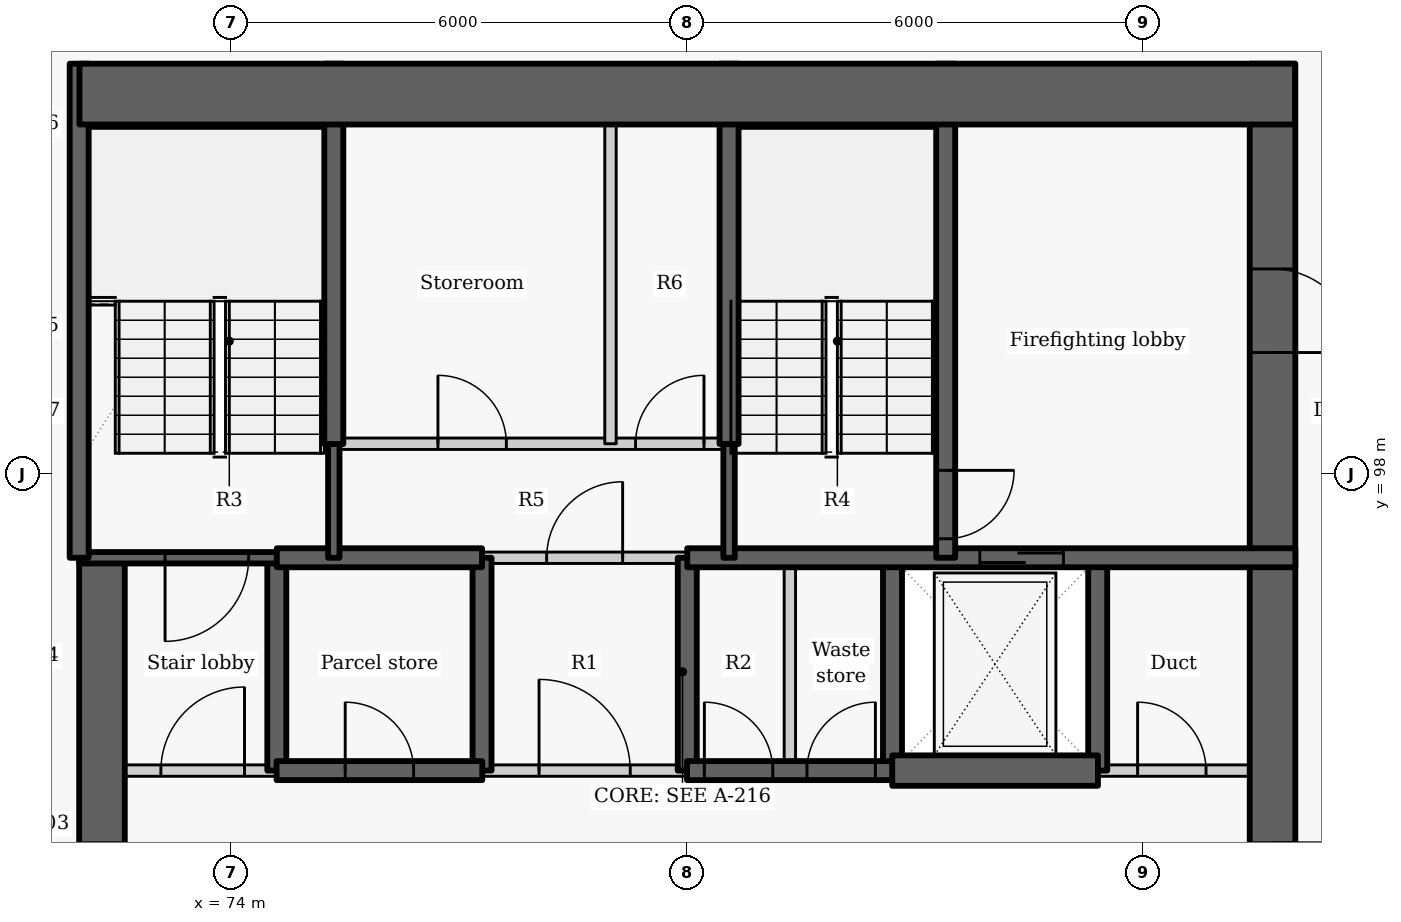
"""IFC4 building model, lengths in metres.
Left out: names, types, materials, properties, quantities, classifications, styles, units other than length and angle.
Written with IfcOpenShell. Run it as: python <this file> out.ifc"""

import sys

from ifc_helpers import new_model, si_unit, direction, frame, frame_2d, origin, place, context, subcontext, project, spatial, rectangle, extrude, element, fill, save


model = new_model("IFC4")
c1 = context("Model", 3, precision=1e-05, world=origin(), true_north=direction((0.0, 1.0)))
c2 = subcontext(c1, "Body", "Model", "MODEL_VIEW")
j1 = project(units=[si_unit("LENGTHUNIT", "METRE"), si_unit("PLANEANGLEUNIT", "RADIAN")], contexts=[c1])
p1 = place(None, origin())
s1 = spatial("IfcSite", under=j1, at=p1, CompositionType="ELEMENT")
p2 = place(p1, origin())
s2 = spatial("IfcBuilding", under=s1, at=p2, CompositionType="ELEMENT")
p3 = place(p2, frame((0.0, 0.0, 77.7)))
s3 = spatial("IfcBuildingStorey", under=s2, at=p3, CompositionType="ELEMENT", Elevation=77.7)
p4 = place(p3, frame((74.6, 94.1, -0.41), z_axis=(0.0, 0.0, 1.0), x_axis=(0.0, 1.0, 0.0)))
e1 = element("IfcWall", 1, at=p4, inside=s3, PredefinedType="SHEAR", context=c2, shape_type="SweptSolid", body=[
    extrude(rectangle(XDim=2.8, YDim=0.25, at=frame_2d((1.4, 0.0))), origin(), (0.0, 0.0, 1.0), 3.435),
])
p5 = place(p3, frame((72.3, 87.8, -0.41), z_axis=(0.0, 0.0, 1.0), x_axis=(0.0, 1.0, 0.0)))
e2 = element("IfcWall", 2, at=p5, inside=s3, PredefinedType="SHEAR", context=c2, shape_type="SweptSolid", body=[
    extrude(rectangle(XDim=9.1, YDim=0.6, at=frame_2d((4.55, 0.0))), origin(), (0.0, 0.0, 1.0), 3.435),
])
p6 = place(p5, frame((3.85, 0.0, 0.41)))
e3 = element("IfcOpeningElement", 3, at=p6, cuts=e2, PredefinedType="OPENING", context=c2, shape_type="SweptSolid", body=[
    extrude(rectangle(XDim=1.5, YDim=2.1, at=frame_2d((0.75, 1.05))), frame((0.0, 0.31, 0.0), z_axis=(0.0, -1.0, 0.0), x_axis=(1.0, 0.0, 0.0)), (0.0, 0.0, 1.0), 0.62),
])
for number, where, z_axis, x_axis in (
    (4, (77.3, 94.1, -0.41), (0.0, 0.0, 1.0), (0.0, 1.0, 0.0)),
    (5, (80.0, 94.1, -0.41), (0.0, 0.0, 1.0), (0.0, 1.0, 0.0)),
    (6, (82.7, 94.1, -0.41), (0.0, 0.0, 1.0), (0.0, 1.0, 0.0)),
    (7, (85.4, 94.1, -0.41), (0.0, 0.0, 1.0), (0.0, 1.0, 0.0)),
):
    element("IfcWall", number, at=place(p3, frame(where, z_axis=z_axis, x_axis=x_axis)), inside=s3, PredefinedType="SHEAR", context=c2, shape_type="SweptSolid", body=[
        extrude(rectangle(XDim=2.8, YDim=0.25, at=frame_2d((1.4, 0.0))), origin(), (0.0, 0.0, 1.0), 3.435),
    ])
p7 = place(p3, frame((87.7, 103.4, -0.41), z_axis=(0.0, 0.0, 1.0), x_axis=(0.0, -1.0, 0.0)))
e8 = element("IfcWall", 8, at=p7, inside=s3, PredefinedType="SHEAR", context=c2, shape_type="SweptSolid", body=[
    extrude(rectangle(XDim=15.6, YDim=0.6, at=frame_2d((7.8, 0.0))), origin(), (0.0, 0.0, 1.0), 3.435),
])
p8 = place(p7, frame((10.25, 0.0, 0.41)))
e9 = element("IfcOpeningElement", 9, at=p8, cuts=e8, PredefinedType="OPENING", context=c2, shape_type="SweptSolid", body=[
    extrude(rectangle(XDim=1.5, YDim=2.1, at=frame_2d((0.75, 1.05))), frame((0.0, 0.31, 0.0), z_axis=(0.0, -1.0, 0.0), x_axis=(1.0, 0.0, 0.0)), (0.0, 0.0, 1.0), 0.62),
])
p9 = place(p7, frame((2.7, 0.0, 0.41)))
e10 = element("IfcOpeningElement", 10, at=p9, cuts=e8, PredefinedType="OPENING", context=c2, shape_type="SweptSolid", body=[
    extrude(rectangle(XDim=1.1, YDim=2.1, at=frame_2d((0.55, 1.05))), frame((0.0, 0.31, 0.0), z_axis=(0.0, -1.0, 0.0), x_axis=(1.0, 0.0, 0.0)), (0.0, 0.0, 1.0), 0.62),
])
p10 = place(p3, frame((72.0, 94.1, 0.0), z_axis=(0.0, 0.0, 1.0), x_axis=(1.0, 0.0, 0.0)))
e11 = element("IfcWall", 11, at=p10, inside=s3, PredefinedType="PARTITIONING", context=c2, shape_type="SweptSolid", body=[
    extrude(rectangle(XDim=2.603, YDim=0.15, at=frame_2d((1.302, 0.0))), origin(), (0.0, 0.0, 1.0), 3.025),
])
p11 = place(p10, frame((1.075, 0.0, 0.0)))
e12 = element("IfcOpeningElement", 12, at=p11, cuts=e11, PredefinedType="OPENING", context=c2, shape_type="SweptSolid", body=[
    extrude(rectangle(XDim=1.1, YDim=2.1, at=frame_2d((0.55, 1.05))), frame((0.0, 0.085, 0.0), z_axis=(0.0, -1.0, 0.0), x_axis=(1.0, 0.0, 0.0)), (0.0, 0.0, 1.0), 0.17),
])
p12 = place(p3, frame((77.297, 94.1, 0.0), z_axis=(0.0, 0.0, 1.0), x_axis=(1.0, 0.0, 0.0)))
e13 = element("IfcWall", 13, at=p12, inside=s3, PredefinedType="PARTITIONING", context=c2, shape_type="SweptSolid", body=[
    extrude(rectangle(XDim=2.706, YDim=0.15, at=frame_2d((1.353, 0.0))), origin(), (0.0, 0.0, 1.0), 3.025),
])
p13 = place(p12, frame((0.753, 0.0, 0.0)))
e14 = element("IfcOpeningElement", 14, at=p13, cuts=e13, PredefinedType="OPENING", context=c2, shape_type="SweptSolid", body=[
    extrude(rectangle(XDim=1.2, YDim=2.1, at=frame_2d((0.6, 1.05))), frame((0.0, 0.085, 0.0), z_axis=(0.0, -1.0, 0.0), x_axis=(1.0, 0.0, 0.0)), (0.0, 0.0, 1.0), 0.17),
])
p14 = place(p3, frame((85.397, 94.1, 0.0), z_axis=(0.0, 0.0, 1.0), x_axis=(1.0, 0.0, 0.0)))
e15 = element("IfcWall", 15, at=p14, inside=s3, PredefinedType="PARTITIONING", context=c2, shape_type="SweptSolid", body=[
    extrude(rectangle(XDim=2.603, YDim=0.15, at=frame_2d((1.302, 0.0))), origin(), (0.0, 0.0, 1.0), 3.025),
])
p15 = place(p14, frame((0.528, 0.0, 0.0)))
e16 = element("IfcOpeningElement", 16, at=p15, cuts=e15, PredefinedType="OPENING", context=c2, shape_type="SweptSolid", body=[
    extrude(rectangle(XDim=0.9, YDim=2.1, at=frame_2d((0.45, 1.05))), frame((0.0, 0.085, 0.0), z_axis=(0.0, -1.0, 0.0), x_axis=(1.0, 0.0, 0.0)), (0.0, 0.0, 1.0), 0.17),
])
p16 = place(p3, frame((74.597, 94.1, -0.41), z_axis=(0.0, 0.0, 1.0), x_axis=(1.0, 0.0, 0.0)))
e17 = element("IfcWall", 17, at=p16, inside=s3, PredefinedType="SHEAR", context=c2, shape_type="SweptSolid", body=[
    extrude(rectangle(XDim=2.706, YDim=0.25, at=frame_2d((1.353, 0.0))), origin(), (0.0, 0.0, 1.0), 3.435),
])
p17 = place(p16, frame((0.903, 0.0, 0.41)))
e18 = element("IfcOpeningElement", 18, at=p17, cuts=e17, PredefinedType="OPENING", context=c2, shape_type="SweptSolid", body=[
    extrude(rectangle(XDim=0.9, YDim=2.1, at=frame_2d((0.45, 1.05))), frame((0.0, 0.135, 0.0), z_axis=(0.0, -1.0, 0.0), x_axis=(1.0, 0.0, 0.0)), (0.0, 0.0, 1.0), 0.27),
])
p18 = place(p3, frame((79.997, 94.1, -0.41), z_axis=(0.0, 0.0, 1.0), x_axis=(1.0, 0.0, 0.0)))
e19 = element("IfcWall", 19, at=p18, inside=s3, PredefinedType="SHEAR", context=c2, shape_type="SweptSolid", body=[
    extrude(rectangle(XDim=2.706, YDim=0.25, at=frame_2d((1.353, 0.0))), origin(), (0.0, 0.0, 1.0), 3.435),
])
p19 = place(p18, frame((0.228, 0.0, 0.41)))
e20 = element("IfcOpeningElement", 20, at=p19, cuts=e19, PredefinedType="OPENING", context=c2, shape_type="SweptSolid", body=[
    extrude(rectangle(XDim=0.9, YDim=2.1, at=frame_2d((0.45, 1.05))), frame((0.0, 0.135, 0.0), z_axis=(0.0, -1.0, 0.0), x_axis=(1.0, 0.0, 0.0)), (0.0, 0.0, 1.0), 0.27),
])
p20 = place(p18, frame((1.578, 0.0, 0.41)))
e21 = element("IfcOpeningElement", 21, at=p20, cuts=e19, PredefinedType="OPENING", context=c2, shape_type="SweptSolid", body=[
    extrude(rectangle(XDim=0.9, YDim=2.1, at=frame_2d((0.45, 1.05))), frame((0.0, 0.135, 0.0), z_axis=(0.0, -1.0, 0.0), x_axis=(1.0, 0.0, 0.0)), (0.0, 0.0, 1.0), 0.27),
])
p21 = place(p3, frame((82.697, 94.1, -0.41), z_axis=(0.0, 0.0, 1.0), x_axis=(1.0, 0.0, 0.0)))
e22 = element("IfcWall", 22, at=p21, inside=s3, PredefinedType="SHEAR", context=c2, shape_type="SweptSolid", body=[
    extrude(rectangle(XDim=2.706, YDim=0.4, at=frame_2d((1.353, 0.0))), origin(), (0.0, 0.0, 1.0), 3.435),
])
p22 = place(p3, frame((74.6, 96.9, -0.41), z_axis=(0.0, 0.0, 1.0), x_axis=(-1.0, 0.0, 0.0)))
e23 = element("IfcWall", 23, at=p22, inside=s3, PredefinedType="SHEAR", context=c2, shape_type="SweptSolid", body=[
    extrude(rectangle(XDim=2.6, YDim=0.15, at=frame_2d((1.3, 0.0))), origin(), (0.0, 0.0, 1.0), 3.435),
])
p23 = place(p22, frame((0.37, 0.0, 0.41)))
e24 = element("IfcOpeningElement", 24, at=p23, cuts=e23, PredefinedType="OPENING", context=c2, shape_type="SweptSolid", body=[
    extrude(rectangle(XDim=1.1, YDim=2.1, at=frame_2d((0.55, 1.05))), frame((0.0, 0.085, 0.0), z_axis=(0.0, -1.0, 0.0), x_axis=(1.0, 0.0, 0.0)), (0.0, 0.0, 1.0), 0.17),
])
p24 = place(p3, frame((74.6, 96.9, -0.41), z_axis=(0.0, 0.0, 1.0), x_axis=(1.0, 0.0, 0.0)))
e25 = element("IfcWall", 25, at=p24, inside=s3, PredefinedType="SHEAR", context=c2, shape_type="SweptSolid", body=[
    extrude(rectangle(XDim=2.7, YDim=0.25, at=frame_2d((1.35, 0.0))), origin(), (0.0, 0.0, 1.0), 3.435),
])
p25 = place(p3, frame((80.0, 96.9, -0.41), z_axis=(0.0, 0.0, 1.0), x_axis=(1.0, 0.0, 0.0)))
e26 = element("IfcWall", 26, at=p25, inside=s3, PredefinedType="SHEAR", context=c2, shape_type="SweptSolid", body=[
    extrude(rectangle(XDim=8.0, YDim=0.25, at=frame_2d((4.0, 0.0))), origin(), (0.0, 0.0, 1.0), 3.435),
])
p26 = place(p25, frame((3.849, 0.0, 0.41)))
e27 = element("IfcOpeningElement", 27, at=p26, cuts=e26, PredefinedType="OPENING", context=c2, shape_type="SweptSolid", body=[
    extrude(rectangle(XDim=1.1, YDim=2.1, at=frame_2d((0.55, 1.05))), frame((0.0, 0.135, 0.0), z_axis=(0.0, -1.0, 0.0), x_axis=(1.0, 0.0, 0.0)), (0.0, 0.0, 1.0), 0.27),
])
p27 = place(p3, frame((77.3, 96.9, 0.0), z_axis=(0.0, 0.0, 1.0), x_axis=(1.0, 0.0, 0.0)))
e28 = element("IfcWall", 28, at=p27, inside=s3, PredefinedType="PARTITIONING", context=c2, shape_type="SweptSolid", body=[
    extrude(rectangle(XDim=2.7, YDim=0.15, at=frame_2d((1.35, 0.0))), origin(), (0.0, 0.0, 1.0), 3.025),
])
p28 = place(p27, frame((0.85, 0.0, 0.0)))
e29 = element("IfcOpeningElement", 29, at=p28, cuts=e28, PredefinedType="OPENING", context=c2, shape_type="SweptSolid", body=[
    extrude(rectangle(XDim=1.0, YDim=2.1, at=frame_2d((0.5, 1.05))), frame((0.0, 0.085, 0.0), z_axis=(0.0, -1.0, 0.0), x_axis=(1.0, 0.0, 0.0)), (0.0, 0.0, 1.0), 0.17),
])
p29 = place(p3, frame((81.35, 94.1, 0.0), z_axis=(0.0, 0.0, 1.0), x_axis=(0.0, 1.0, 0.0)))
e30 = element("IfcWall", 30, at=p29, inside=s3, PredefinedType="PARTITIONING", context=c2, shape_type="SweptSolid", body=[
    extrude(rectangle(XDim=2.8, YDim=0.15, at=frame_2d((1.4, 0.0))), origin(), (0.0, 0.0, 1.0), 3.025),
])
p30 = place(p3, frame((75.35, 96.9, -0.41), z_axis=(0.0, 0.0, 1.0), x_axis=(0.0, 1.0, 0.0)))
e31 = element("IfcWall", 31, at=p30, inside=s3, PredefinedType="SHEAR", context=c2, shape_type="SweptSolid", body=[
    extrude(rectangle(XDim=1.503, YDim=0.15, at=frame_2d((0.751, 0.0))), origin(), (0.0, 0.0, 1.0), 3.435),
])
p31 = place(p3, frame((75.35, 98.397, -0.41), z_axis=(0.0, 0.0, 1.0), x_axis=(0.0, 1.0, 0.0)))
e32 = element("IfcWall", 32, at=p31, inside=s3, PredefinedType="SHEAR", context=c2, shape_type="SweptSolid", body=[
    extrude(rectangle(XDim=5.003, YDim=0.25, at=frame_2d((2.501, 0.0))), origin(), (0.0, 0.0, 1.0), 3.435),
])
p32 = place(p3, frame((72.0, 96.9, -0.41), z_axis=(0.0, 0.0, 1.0), x_axis=(0.0, 1.0, 0.0)))
e33 = element("IfcWall", 33, at=p32, inside=s3, PredefinedType="SHEAR", context=c2, shape_type="SweptSolid", body=[
    extrude(rectangle(XDim=6.5, YDim=0.25, at=frame_2d((3.25, 0.0))), origin(), (0.0, 0.0, 1.0), 3.435),
])
p33 = place(p3, frame((83.4, 103.4, -0.41), z_axis=(0.0, 0.0, 1.0), x_axis=(0.0, -1.0, 0.0)))
e34 = element("IfcWall", 34, at=p33, inside=s3, PredefinedType="SHEAR", context=c2, shape_type="SweptSolid", body=[
    extrude(rectangle(XDim=6.5, YDim=0.25, at=frame_2d((3.25, 0.0))), origin(), (0.0, 0.0, 1.0), 3.435),
])
p34 = place(p33, frame((5.35, 0.0, 0.41)))
e35 = element("IfcOpeningElement", 35, at=p34, cuts=e34, PredefinedType="OPENING", context=c2, shape_type="SweptSolid", body=[
    extrude(rectangle(XDim=0.9, YDim=2.1, at=frame_2d((0.45, 1.05))), frame((0.0, 0.135, 0.0), z_axis=(0.0, -1.0, 0.0), x_axis=(1.0, 0.0, 0.0)), (0.0, 0.0, 1.0), 0.27),
])
p35 = place(p3, frame((80.55, 96.9, -0.41), z_axis=(0.0, 0.0, 1.0), x_axis=(0.0, 1.0, 0.0)))
e36 = element("IfcWall", 36, at=p35, inside=s3, PredefinedType="SHEAR", context=c2, shape_type="SweptSolid", body=[
    extrude(rectangle(XDim=1.503, YDim=0.15, at=frame_2d((0.751, 0.0))), origin(), (0.0, 0.0, 1.0), 3.435),
])
p36 = place(p3, frame((80.55, 98.397, -0.41), z_axis=(0.0, 0.0, 1.0), x_axis=(0.0, 1.0, 0.0)))
e37 = element("IfcWall", 37, at=p36, inside=s3, PredefinedType="SHEAR", context=c2, shape_type="SweptSolid", body=[
    extrude(rectangle(XDim=5.003, YDim=0.25, at=frame_2d((2.501, 0.0))), origin(), (0.0, 0.0, 1.0), 3.435),
])
p37 = place(p3, frame((75.35, 98.4, 0.0), z_axis=(0.0, 0.0, 1.0), x_axis=(1.0, 0.0, 0.0)))
e38 = element("IfcWall", 38, at=p37, inside=s3, PredefinedType="PARTITIONING", context=c2, shape_type="SweptSolid", body=[
    extrude(rectangle(XDim=5.2, YDim=0.15, at=frame_2d((2.6, 0.0))), origin(), (0.0, 0.0, 1.0), 3.025),
])
p38 = place(p37, frame((1.37, 0.0, 0.0)))
e39 = element("IfcOpeningElement", 39, at=p38, cuts=e38, PredefinedType="OPENING", context=c2, shape_type="SweptSolid", body=[
    extrude(rectangle(XDim=0.9, YDim=2.1, at=frame_2d((0.45, 1.05))), frame((0.0, 0.085, 0.0), z_axis=(0.0, -1.0, 0.0), x_axis=(1.0, 0.0, 0.0)), (0.0, 0.0, 1.0), 0.17),
])
p39 = place(p37, frame((3.97, 0.0, 0.0)))
e40 = element("IfcOpeningElement", 40, at=p39, cuts=e38, PredefinedType="OPENING", context=c2, shape_type="SweptSolid", body=[
    extrude(rectangle(XDim=0.9, YDim=2.1, at=frame_2d((0.45, 1.05))), frame((0.0, 0.085, 0.0), z_axis=(0.0, -1.0, 0.0), x_axis=(1.0, 0.0, 0.0)), (0.0, 0.0, 1.0), 0.17),
])
p40 = place(p3, frame((78.99, 98.4, 0.0), z_axis=(0.0, 0.0, 1.0), x_axis=(0.0, 1.0, 0.0)))
e41 = element("IfcWall", 41, at=p40, inside=s3, PredefinedType="PARTITIONING", context=c2, shape_type="SweptSolid", body=[
    extrude(rectangle(XDim=5.0, YDim=0.15, at=frame_2d((2.5, 0.0))), origin(), (0.0, 0.0, 1.0), 3.025),
])
p41 = place(p3, frame((72.004, 103.0, -0.41), z_axis=(0.0, 0.0, 1.0), x_axis=(1.0, 0.0, 0.0)))
e42 = element("IfcWall", 42, at=p41, inside=s3, PredefinedType="SHEAR", context=c2, shape_type="SweptSolid", body=[
    extrude(rectangle(XDim=15.992, YDim=0.8, at=frame_2d((7.996, 0.0))), origin(), (0.0, 0.0, 1.0), 3.435),
])
p42 = place(p11, origin())
e43 = element("IfcDoor", 43, at=p42, inside=s3, OperationType="SINGLE_SWING_RIGHT", PredefinedType="DOOR", context=c2, shape_type="SweptSolid", body=[
    extrude(rectangle(XDim=1.1, YDim=2.1, at=frame_2d((0.55, 1.05))), frame((0.0, 0.025, 0.0), z_axis=(0.0, -1.0, 0.0), x_axis=(1.0, 0.0, 0.0)), (0.0, 0.0, 1.0), 0.05),
])
fill(e12, e43)
p43 = place(p17, origin())
e44 = element("IfcDoor", 44, at=p43, inside=s3, OperationType="SINGLE_SWING_LEFT", PredefinedType="DOOR", context=c2, shape_type="SweptSolid", body=[
    extrude(rectangle(XDim=0.9, YDim=2.1, at=frame_2d((0.45, 1.05))), frame((0.0, 0.025, 0.0), z_axis=(0.0, -1.0, 0.0), x_axis=(1.0, 0.0, 0.0)), (0.0, 0.0, 1.0), 0.05),
])
fill(e18, e44)
p44 = place(p13, origin())
e45 = element("IfcDoor", 45, at=p44, inside=s3, OperationType="DOUBLE_DOOR_SINGLE_SWING", PredefinedType="DOOR", context=c2, shape_type="SweptSolid", body=[
    extrude(rectangle(XDim=1.2, YDim=2.1, at=frame_2d((0.6, 1.05))), frame((0.0, 0.025, 0.0), z_axis=(0.0, -1.0, 0.0), x_axis=(1.0, 0.0, 0.0)), (0.0, 0.0, 1.0), 0.05),
])
fill(e14, e45)
p45 = place(p19, origin())
e46 = element("IfcDoor", 46, at=p45, inside=s3, OperationType="SINGLE_SWING_LEFT", PredefinedType="DOOR", context=c2, shape_type="SweptSolid", body=[
    extrude(rectangle(XDim=0.9, YDim=2.1, at=frame_2d((0.45, 1.05))), frame((0.0, 0.025, 0.0), z_axis=(0.0, -1.0, 0.0), x_axis=(1.0, 0.0, 0.0)), (0.0, 0.0, 1.0), 0.05),
])
fill(e20, e46)
p46 = place(p20, origin())
e47 = element("IfcDoor", 47, at=p46, inside=s3, OperationType="SINGLE_SWING_RIGHT", PredefinedType="DOOR", context=c2, shape_type="SweptSolid", body=[
    extrude(rectangle(XDim=0.9, YDim=2.1, at=frame_2d((0.45, 1.05))), frame((0.0, 0.025, 0.0), z_axis=(0.0, -1.0, 0.0), x_axis=(1.0, 0.0, 0.0)), (0.0, 0.0, 1.0), 0.05),
])
fill(e21, e47)
p47 = place(p26, origin())
e48 = element("IfcDoor", 48, at=p47, inside=s3, OperationType="SLIDING_TO_LEFT", PredefinedType="DOOR", context=c2, shape_type="SweptSolid", body=[
    extrude(rectangle(XDim=1.1, YDim=2.1, at=frame_2d((0.55, 1.05))), frame((0.0, 0.025, 0.0), z_axis=(0.0, -1.0, 0.0), x_axis=(1.0, 0.0, 0.0)), (0.0, 0.0, 1.0), 0.05),
])
fill(e27, e48)
p48 = place(p15, origin())
e49 = element("IfcDoor", 49, at=p48, inside=s3, OperationType="SINGLE_SWING_LEFT", PredefinedType="DOOR", context=c2, shape_type="SweptSolid", body=[
    extrude(rectangle(XDim=0.9, YDim=2.1, at=frame_2d((0.45, 1.05))), frame((0.0, 0.025, 0.0), z_axis=(0.0, -1.0, 0.0), x_axis=(1.0, 0.0, 0.0)), (0.0, 0.0, 1.0), 0.05),
])
fill(e16, e49)
p49 = place(p28, origin())
e50 = element("IfcDoor", 50, at=p49, inside=s3, OperationType="SINGLE_SWING_RIGHT", PredefinedType="DOOR", context=c2, shape_type="SweptSolid", body=[
    extrude(rectangle(XDim=1.0, YDim=2.1, at=frame_2d((0.5, 1.05))), frame((0.0, 0.025, 0.0), z_axis=(0.0, -1.0, 0.0), x_axis=(1.0, 0.0, 0.0)), (0.0, 0.0, 1.0), 0.05),
])
fill(e29, e50)
p50 = place(p38, origin())
e51 = element("IfcDoor", 51, at=p50, inside=s3, OperationType="SINGLE_SWING_LEFT", PredefinedType="DOOR", context=c2, shape_type="SweptSolid", body=[
    extrude(rectangle(XDim=0.9, YDim=2.1, at=frame_2d((0.45, 1.05))), frame((0.0, 0.025, 0.0), z_axis=(0.0, -1.0, 0.0), x_axis=(1.0, 0.0, 0.0)), (0.0, 0.0, 1.0), 0.05),
])
fill(e39, e51)
p51 = place(p39, origin())
e52 = element("IfcDoor", 52, at=p51, inside=s3, OperationType="SINGLE_SWING_RIGHT", PredefinedType="DOOR", context=c2, shape_type="SweptSolid", body=[
    extrude(rectangle(XDim=0.9, YDim=2.1, at=frame_2d((0.45, 1.05))), frame((0.0, 0.025, 0.0), z_axis=(0.0, -1.0, 0.0), x_axis=(1.0, 0.0, 0.0)), (0.0, 0.0, 1.0), 0.05),
])
fill(e40, e52)
p52 = place(p23, origin())
e53 = element("IfcDoor", 53, at=p52, inside=s3, OperationType="SINGLE_SWING_RIGHT", PredefinedType="DOOR", context=c2, shape_type="SweptSolid", body=[
    extrude(rectangle(XDim=1.1, YDim=2.1, at=frame_2d((0.55, 1.05))), frame((0.0, 0.025, 0.0), z_axis=(0.0, -1.0, 0.0), x_axis=(1.0, 0.0, 0.0)), (0.0, 0.0, 1.0), 0.05),
])
fill(e24, e53)
p53 = place(p34, origin())
e54 = element("IfcDoor", 54, at=p53, inside=s3, OperationType="SINGLE_SWING_LEFT", PredefinedType="DOOR", context=c2, shape_type="SweptSolid", body=[
    extrude(rectangle(XDim=0.9, YDim=2.1, at=frame_2d((0.45, 1.05))), frame((0.0, 0.025, 0.0), z_axis=(0.0, -1.0, 0.0), x_axis=(1.0, 0.0, 0.0)), (0.0, 0.0, 1.0), 0.05),
])
fill(e35, e54)
p54 = place(p6, origin())
e55 = element("IfcDoor", 55, at=p54, inside=s3, OperationType="DOUBLE_DOOR_SINGLE_SWING", PredefinedType="DOOR", context=c2, shape_type="SweptSolid", body=[
    extrude(rectangle(XDim=1.5, YDim=2.1, at=frame_2d((0.75, 1.05))), frame((0.0, 0.025, 0.0), z_axis=(0.0, -1.0, 0.0), x_axis=(1.0, 0.0, 0.0)), (0.0, 0.0, 1.0), 0.05),
])
fill(e3, e55)
p55 = place(p9, origin())
e56 = element("IfcDoor", 56, at=p55, inside=s3, OperationType="SINGLE_SWING_RIGHT", PredefinedType="DOOR", context=c2, shape_type="SweptSolid", body=[
    extrude(rectangle(XDim=1.1, YDim=2.1, at=frame_2d((0.55, 1.05))), frame((0.0, 0.025, 0.0), z_axis=(0.0, -1.0, 0.0), x_axis=(1.0, 0.0, 0.0)), (0.0, 0.0, 1.0), 0.05),
])
fill(e10, e56)
save(model, sys.argv[1])
